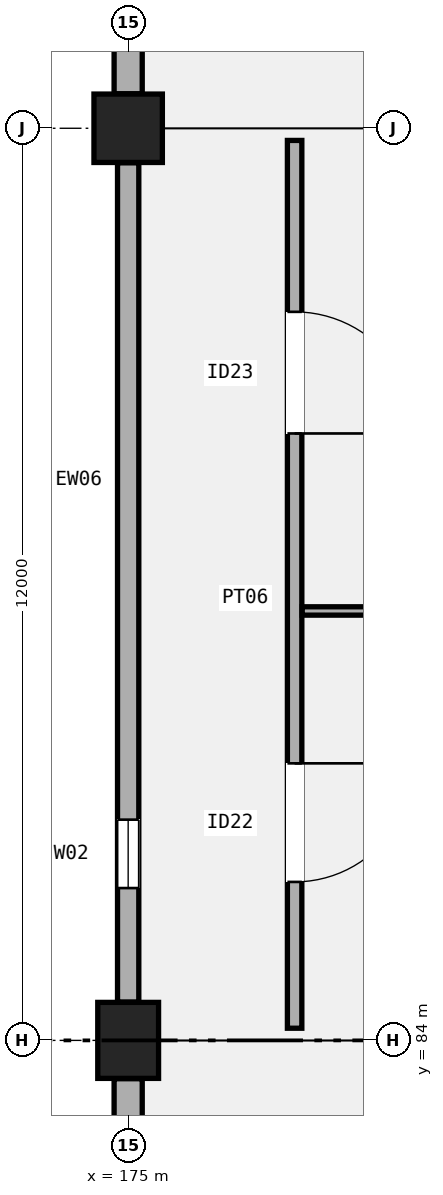
"""IFC4 building model, lengths in metres.
Left out: names, types, materials, properties, quantities, classifications, styles, units other than length and angle.
Written with IfcOpenShell. Run it as: python <this file> out.ifc"""

import sys

from ifc_helpers import new_model, si_unit, direction, frame, frame_2d, origin, origin_2d, place, context, subcontext, project, spatial, rectangle, extrude, element, fill, save


model = new_model("IFC4")
c1 = context("Model", 3, precision=1e-05, world=origin(), true_north=direction((0.0, 1.0)))
c2 = subcontext(c1, "Body", "Model", "MODEL_VIEW")
j1 = project(units=[si_unit("LENGTHUNIT", "METRE"), si_unit("PLANEANGLEUNIT", "RADIAN")], contexts=[c1])
p1 = place(None, origin())
s1 = spatial("IfcSite", under=j1, at=p1, CompositionType="ELEMENT")
p2 = place(p1, origin())
s2 = spatial("IfcBuilding", under=s1, at=p2, CompositionType="ELEMENT")
p3 = place(p2, frame((0.0, 0.0, 10.2)))
s3 = spatial("IfcBuildingStorey", under=s2, at=p3, CompositionType="ELEMENT", Elevation=10.2)
p4 = place(p3, frame((175.0, 84.0, 0.0), z_axis=(0.0, 0.0, 1.0), x_axis=(1.0, 0.0, 0.0)))
e1 = element("IfcColumn", 1, at=p4, inside=s3, PredefinedType="COLUMN", context=c2, shape_type="SweptSolid", body=[
    extrude(rectangle(XDim=0.8, YDim=1.0, at=origin_2d()), origin(), (0.0, 0.0, 1.0), 5.1),
])
p5 = place(p3, frame((175.0, 96.0, 0.0), z_axis=(0.0, 0.0, 1.0), x_axis=(1.0, 0.0, 0.0)))
e2 = element("IfcColumn", 2, at=p5, inside=s3, PredefinedType="COLUMN", context=c2, shape_type="SweptSolid", body=[
    extrude(rectangle(XDim=0.9, YDim=0.9, at=origin_2d()), origin(), (0.0, 0.0, 1.0), 5.1),
])
p6 = place(p3, frame((175.0, 82.846, 0.0), z_axis=(0.0, 0.0, 1.0), x_axis=(0.0, 1.0, 0.0)))
e3 = element("IfcWall", 3, at=p6, inside=s3, PredefinedType="SOLIDWALL", context=c2, shape_type="SweptSolid", body=[
    extrude(rectangle(XDim=0.65, YDim=0.37, at=frame_2d((0.325, 0.0))), origin(), (0.0, 0.0, 1.0), 4.232),
])
p7 = place(p3, frame((175.0, 84.504, 0.0), z_axis=(0.0, 0.0, 1.0), x_axis=(0.0, 1.0, 0.0)))
e4 = element("IfcWall", 4, at=p7, inside=s3, PredefinedType="SOLIDWALL", context=c2, shape_type="SweptSolid", body=[
    extrude(rectangle(XDim=11.042, YDim=0.28, at=frame_2d((5.521, 0.0))), origin(), (0.0, 0.0, 1.0), 4.02),
])
p8 = place(p7, frame((1.5, 0.0, 0.95)))
e5 = element("IfcOpeningElement", 5, at=p8, cuts=e4, PredefinedType="OPENING", context=c2, shape_type="SweptSolid", body=[
    extrude(rectangle(XDim=0.9, YDim=2.4, at=frame_2d((0.45, 1.2))), frame((0.0, 0.15, 0.0), z_axis=(0.0, -1.0, 0.0), x_axis=(1.0, 0.0, 0.0)), (0.0, 0.0, 1.0), 0.3),
])
p9 = place(p3, frame((175.0, 96.454, 0.0), z_axis=(0.0, 0.0, 1.0), x_axis=(0.0, 1.0, 0.0)))
e6 = element("IfcWall", 6, at=p9, inside=s3, PredefinedType="SOLIDWALL", context=c2, shape_type="SweptSolid", body=[
    extrude(rectangle(XDim=0.65, YDim=0.37, at=frame_2d((0.325, 0.0))), origin(), (0.0, 0.0, 1.0), 4.12),
])
p10 = place(p3, frame((177.19, 84.16, 0.0), z_axis=(0.0, 0.0, 1.0), x_axis=(0.0, 1.0, 0.0)))
e7 = element("IfcWall", 7, at=p10, inside=s3, PredefinedType="PARTITIONING", context=c2, shape_type="SweptSolid", body=[
    extrude(rectangle(XDim=11.68, YDim=0.19, at=frame_2d((5.84, 0.0))), origin(), (0.0, 0.0, 1.0), 4.22),
])
p11 = place(p10, frame((3.485, 0.0, 0.0), z_axis=(0.0, 0.0, 1.0), x_axis=(-1.0, 0.0, 0.0)))
e8 = element("IfcOpeningElement", 8, at=p11, cuts=e7, PredefinedType="OPENING", context=c2, shape_type="SweptSolid", body=[
    extrude(rectangle(XDim=1.56, YDim=2.26, at=frame_2d((0.78, 1.13))), frame((0.0, 0.105, 0.0), z_axis=(0.0, -1.0, 0.0), x_axis=(1.0, 0.0, 0.0)), (0.0, 0.0, 1.0), 0.21),
])
p12 = place(p10, frame((9.425, 0.0, 0.0), z_axis=(0.0, 0.0, 1.0), x_axis=(-1.0, 0.0, 0.0)))
e9 = element("IfcOpeningElement", 9, at=p12, cuts=e7, PredefinedType="OPENING", context=c2, shape_type="SweptSolid", body=[
    extrude(rectangle(XDim=1.6, YDim=2.3, at=frame_2d((0.8, 1.15))), frame((0.0, 0.105, 0.0), z_axis=(0.0, -1.0, 0.0), x_axis=(1.0, 0.0, 0.0)), (0.0, 0.0, 1.0), 0.21),
])
p13 = place(p3, frame((177.29, 89.65, 0.0), z_axis=(0.0, 0.0, 1.0), x_axis=(1.0, 0.0, 0.0)))
e10 = element("IfcWall", 10, at=p13, inside=s3, PredefinedType="PARTITIONING", context=c2, shape_type="SweptSolid", body=[
    extrude(rectangle(XDim=10.13, YDim=0.11, at=frame_2d((5.065, 0.0))), origin(), (0.0, 0.0, 1.0), 4.22),
])
p14 = place(p8, origin())
e11 = element("IfcWindow", 11, at=p14, inside=s3, PartitioningType="SINGLE_PANEL", PredefinedType="WINDOW", context=c2, shape_type="SweptSolid", body=[
    extrude(rectangle(XDim=0.9, YDim=2.4, at=frame_2d((0.45, 1.2))), frame((0.0, 0.03, 0.0), z_axis=(0.0, -1.0, 0.0), x_axis=(1.0, 0.0, 0.0)), (0.0, 0.0, 1.0), 0.06),
])
fill(e5, e11)
p15 = place(p11, origin())
e12 = element("IfcDoor", 12, at=p15, inside=s3, OperationType="SINGLE_SWING_LEFT", PredefinedType="DOOR", context=c2, shape_type="SweptSolid", body=[
    extrude(rectangle(XDim=1.56, YDim=2.26, at=frame_2d((0.78, 1.13))), frame((0.0, 0.025, 0.0), z_axis=(0.0, -1.0, 0.0), x_axis=(1.0, 0.0, 0.0)), (0.0, 0.0, 1.0), 0.05),
])
fill(e8, e12)
p16 = place(p12, origin())
e13 = element("IfcDoor", 13, at=p16, inside=s3, OperationType="SINGLE_SWING_RIGHT", PredefinedType="DOOR", context=c2, shape_type="SweptSolid", body=[
    extrude(rectangle(XDim=1.6, YDim=2.3, at=frame_2d((0.8, 1.15))), frame((0.0, 0.025, 0.0), z_axis=(0.0, -1.0, 0.0), x_axis=(1.0, 0.0, 0.0)), (0.0, 0.0, 1.0), 0.05),
])
fill(e9, e13)
save(model, sys.argv[1])
